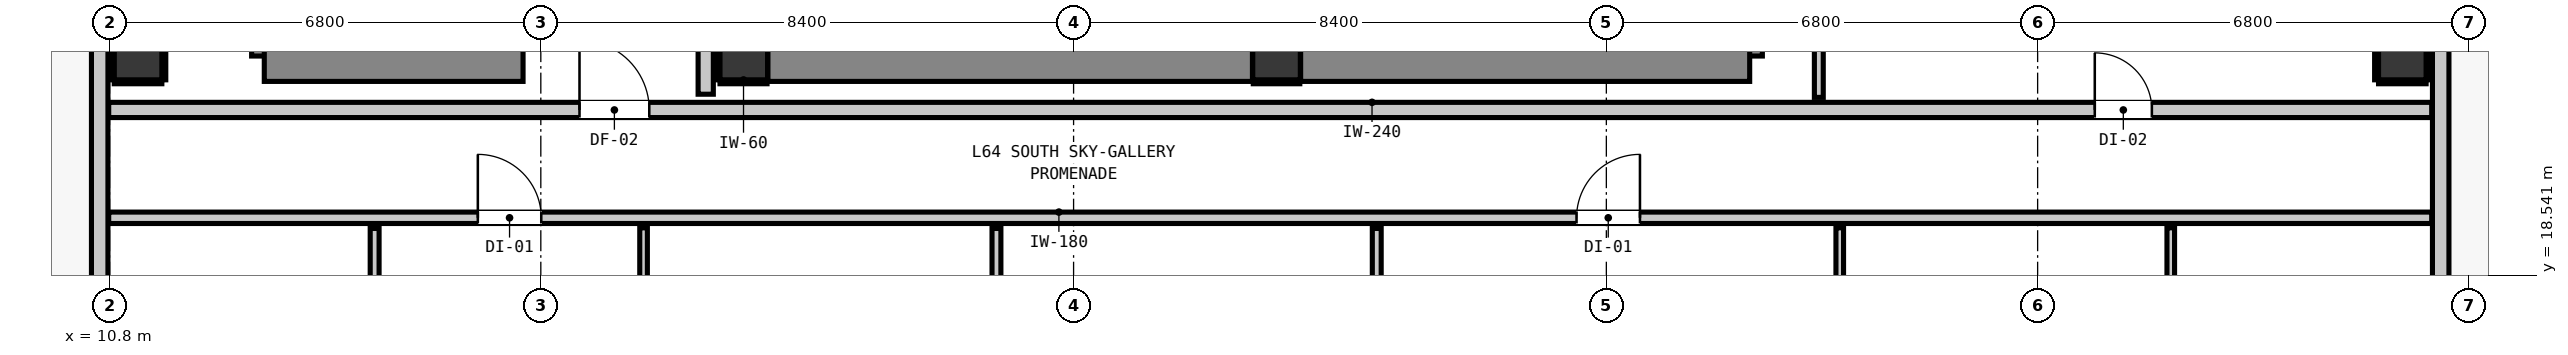
"""IFC4 building model, lengths in metres.
Left out: names, types, materials, properties, quantities, classifications, styles, units other than length and angle.
Written with IfcOpenShell. Run it as: python <this file> out.ifc"""

import sys

from ifc_helpers import new_model, si_unit, direction, frame, frame_2d, origin, origin_2d, place, context, subcontext, project, spatial, rectangle, extrude, element, fill, save


model = new_model("IFC4")
c1 = context("Model", 3, precision=1e-05, world=origin(), true_north=direction((0.0, 1.0)))
c2 = subcontext(c1, "Body", "Model", "MODEL_VIEW")
j1 = project(units=[si_unit("LENGTHUNIT", "METRE"), si_unit("PLANEANGLEUNIT", "RADIAN")], contexts=[c1])
p1 = place(None, origin())
s1 = spatial("IfcSite", under=j1, at=p1, CompositionType="ELEMENT")
p2 = place(p1, origin())
s2 = spatial("IfcBuilding", under=s1, at=p2, CompositionType="ELEMENT")
p3 = place(p2, frame((0.0, 0.0, 220.04)))
s3 = spatial("IfcBuildingStorey", under=s2, at=p3, CompositionType="ELEMENT", Elevation=220.04)
for number, where, z_axis, x_axis in (
    (1, (20.8, 22.0, 0.0), (0.0, 0.0, 1.0), (1.0, 0.0, 0.0)),
    (2, (29.2, 22.0, 0.0), (0.0, 0.0, 1.0), (1.0, 0.0, 0.0)),
):
    element("IfcColumn", number, at=place(p3, frame(where, z_axis=z_axis, x_axis=x_axis)), inside=s3, PredefinedType="COLUMN", context=c2, shape_type="SweptSolid", body=[
        extrude(rectangle(XDim=0.75, YDim=0.75, at=origin_2d()), origin(), (0.0, 0.0, 1.0), 3.32),
    ])
p4 = place(p3, frame((13.44, 22.0, 0.0), z_axis=(0.0, 0.0, 1.0), x_axis=(0.0, 1.0, 0.0)))
e3 = element("IfcWall", 3, at=p4, inside=s3, PredefinedType="SHEAR", context=c2, shape_type="SweptSolid", body=[
    extrude(rectangle(XDim=8.32, YDim=0.8, at=frame_2d((4.16, 0.0))), origin(), (0.0, 0.0, 1.0), 3.32),
])
p5 = place(p3, frame((13.24, 22.0, 0.0), z_axis=(0.0, 0.0, 1.0), x_axis=(1.0, 0.0, 0.0)))
e4 = element("IfcWall", 4, at=p5, inside=s3, PredefinedType="SHEAR", context=c2, shape_type="SweptSolid", body=[
    extrude(rectangle(XDim=4.08, YDim=0.8, at=frame_2d((2.04, 0.0))), origin(), (0.0, 0.0, 1.0), 3.32),
])
p6 = place(p3, frame((36.46, 22.0, 0.0), z_axis=(0.0, 0.0, 1.0), x_axis=(0.0, 1.0, 0.0)))
e5 = element("IfcWall", 5, at=p6, inside=s3, PredefinedType="SHEAR", context=c2, shape_type="SweptSolid", body=[
    extrude(rectangle(XDim=8.32, YDim=0.8, at=frame_2d((4.16, 0.0))), origin(), (0.0, 0.0, 1.0), 3.32),
])
p7 = place(p3, frame((29.58, 22.0, 0.0), z_axis=(0.0, 0.0, 1.0), x_axis=(1.0, 0.0, 0.0)))
e6 = element("IfcWall", 6, at=p7, inside=s3, PredefinedType="SHEAR", context=c2, shape_type="SweptSolid", body=[
    extrude(rectangle(XDim=7.08, YDim=0.8, at=frame_2d((3.54, 0.0))), origin(), (0.0, 0.0, 1.0), 3.32),
])
p8 = place(p3, frame((21.18, 22.0, 0.0), z_axis=(0.0, 0.0, 1.0), x_axis=(1.0, 0.0, 0.0)))
e7 = element("IfcWall", 7, at=p8, inside=s3, PredefinedType="SHEAR", context=c2, shape_type="SweptSolid", body=[
    extrude(rectangle(XDim=7.64, YDim=0.8, at=frame_2d((3.82, 0.0))), origin(), (0.0, 0.0, 1.0), 3.32),
])
for number, where, z_axis, x_axis in (
    (8, (11.25, 22.0, 0.0), (0.0, 0.0, 1.0), (1.0, 0.0, 0.0)),
    (9, (46.95, 22.0, 0.0), (0.0, 0.0, 1.0), (1.0, 0.0, 0.0)),
):
    element("IfcColumn", number, at=place(p3, frame(where, z_axis=z_axis, x_axis=x_axis)), inside=s3, PredefinedType="COLUMN", context=c2, shape_type="SweptSolid", body=[
        extrude(rectangle(XDim=0.75, YDim=0.75, at=origin_2d()), origin(), (0.0, 0.0, 1.0), 3.32),
    ])
p9 = place(p3, frame((10.645, 12.345, 0.0), z_axis=(0.0, 0.0, 1.0), x_axis=(0.0, 1.0, 0.0)))
e10 = element("IfcWall", 10, at=p9, inside=s3, PredefinedType="STANDARD", context=c2, shape_type="SweptSolid", body=[
    extrude(rectangle(XDim=30.31, YDim=0.26, at=frame_2d((15.155, 0.0))), origin(), (0.0, 0.0, 1.0), 3.1),
])
p10 = place(p9, frame((0.91, 0.0, 0.0)))
e11 = element("IfcOpeningElement", 11, at=p10, cuts=e10, PredefinedType="OPENING", context=c2, shape_type="SweptSolid", body=[
    extrude(rectangle(XDim=1.0, YDim=2.15, at=frame_2d((0.5, 1.075))), frame((0.0, 0.14, 0.0), z_axis=(0.0, -1.0, 0.0), x_axis=(1.0, 0.0, 0.0)), (0.0, 0.0, 1.0), 0.28),
])
p11 = place(p9, frame((2.322, 0.0, 0.85)))
e12 = element("IfcOpeningElement", 12, at=p11, cuts=e10, PredefinedType="OPENING", context=c2, shape_type="SweptSolid", body=[
    extrude(rectangle(XDim=0.58, YDim=1.5, at=frame_2d((0.29, 0.75))), frame((0.0, 0.14, 0.0), z_axis=(0.0, -1.0, 0.0), x_axis=(1.0, 0.0, 0.0)), (0.0, 0.0, 1.0), 0.28),
])
p12 = place(p3, frame((47.555, 42.655, 0.0), z_axis=(0.0, 0.0, 1.0), x_axis=(0.0, -1.0, 0.0)))
e13 = element("IfcWall", 13, at=p12, inside=s3, PredefinedType="STANDARD", context=c2, shape_type="SweptSolid", body=[
    extrude(rectangle(XDim=30.31, YDim=0.26, at=frame_2d((15.155, 0.0))), origin(), (0.0, 0.0, 1.0), 3.1),
])
p13 = place(p12, frame((4.082, 0.0, 0.0)))
e14 = element("IfcOpeningElement", 14, at=p13, cuts=e13, PredefinedType="OPENING", context=c2, shape_type="SweptSolid", body=[
    extrude(rectangle(XDim=1.0, YDim=2.15, at=frame_2d((0.5, 1.075))), frame((0.0, 0.14, 0.0), z_axis=(0.0, -1.0, 0.0), x_axis=(1.0, 0.0, 0.0)), (0.0, 0.0, 1.0), 0.28),
])
p14 = place(p12, frame((24.701, 0.0, 0.85)))
e15 = element("IfcOpeningElement", 15, at=p14, cuts=e13, PredefinedType="OPENING", context=c2, shape_type="SweptSolid", body=[
    extrude(rectangle(XDim=0.9, YDim=1.5, at=frame_2d((0.45, 0.75))), frame((0.0, 0.14, 0.0), z_axis=(0.0, -1.0, 0.0), x_axis=(1.0, 0.0, 0.0)), (0.0, 0.0, 1.0), 0.28),
])
p15 = place(p12, frame((28.258, 0.0, 0.85)))
e16 = element("IfcOpeningElement", 16, at=p15, cuts=e13, PredefinedType="OPENING", context=c2, shape_type="SweptSolid", body=[
    extrude(rectangle(XDim=0.9, YDim=1.5, at=frame_2d((0.45, 0.75))), frame((0.0, 0.14, 0.0), z_axis=(0.0, -1.0, 0.0), x_axis=(1.0, 0.0, 0.0)), (0.0, 0.0, 1.0), 0.28),
])
p16 = place(p12, frame((15.855, 0.0, 0.85)))
e17 = element("IfcOpeningElement", 17, at=p16, cuts=e13, PredefinedType="OPENING", context=c2, shape_type="SweptSolid", body=[
    extrude(rectangle(XDim=0.9, YDim=1.5, at=frame_2d((0.45, 0.75))), frame((0.0, 0.14, 0.0), z_axis=(0.0, -1.0, 0.0), x_axis=(1.0, 0.0, 0.0)), (0.0, 0.0, 1.0), 0.28),
])
p17 = place(p3, frame((10.787, 21.15, 0.0), z_axis=(0.0, 0.0, 1.0), x_axis=(1.0, 0.0, 0.0)))
e18 = element("IfcWall", 18, at=p17, inside=s3, PredefinedType="PARTITIONING", context=c2, shape_type="SweptSolid", body=[
    extrude(rectangle(XDim=36.626, YDim=0.24, at=frame_2d((18.313, 0.0))), origin(), (0.0, 0.0, 1.0), 3.1),
])
p18 = place(p17, frame((7.423, 0.0, 0.0)))
e19 = element("IfcOpeningElement", 19, at=p18, cuts=e18, PredefinedType="OPENING", context=c2, shape_type="SweptSolid", body=[
    extrude(rectangle(XDim=1.1, YDim=2.15, at=frame_2d((0.55, 1.075))), frame((0.0, 0.13, 0.0), z_axis=(0.0, -1.0, 0.0), x_axis=(1.0, 0.0, 0.0)), (0.0, 0.0, 1.0), 0.26),
])
p19 = place(p17, frame((31.314, 0.0, 0.0)))
e20 = element("IfcOpeningElement", 20, at=p19, cuts=e18, PredefinedType="OPENING", context=c2, shape_type="SweptSolid", body=[
    extrude(rectangle(XDim=0.9, YDim=2.1, at=frame_2d((0.45, 1.05))), frame((0.0, 0.13, 0.0), z_axis=(0.0, -1.0, 0.0), x_axis=(1.0, 0.0, 0.0)), (0.0, 0.0, 1.0), 0.26),
])
p20 = place(p3, frame((10.787, 19.45, 0.0), z_axis=(0.0, 0.0, 1.0), x_axis=(1.0, 0.0, 0.0)))
e21 = element("IfcWall", 21, at=p20, inside=s3, PredefinedType="PARTITIONING", context=c2, shape_type="SweptSolid", body=[
    extrude(rectangle(XDim=36.626, YDim=0.18, at=frame_2d((18.313, 0.0))), origin(), (0.0, 0.0, 1.0), 3.1),
])
p21 = place(p20, frame((5.82, 0.0, 0.0)))
e22 = element("IfcOpeningElement", 22, at=p21, cuts=e21, PredefinedType="OPENING", context=c2, shape_type="SweptSolid", body=[
    extrude(rectangle(XDim=1.0, YDim=2.15, at=frame_2d((0.5, 1.075))), frame((0.0, 0.1, 0.0), z_axis=(0.0, -1.0, 0.0), x_axis=(1.0, 0.0, 0.0)), (0.0, 0.0, 1.0), 0.2),
])
p22 = place(p20, frame((23.143, 0.0, 0.0)))
e23 = element("IfcOpeningElement", 23, at=p22, cuts=e21, PredefinedType="OPENING", context=c2, shape_type="SweptSolid", body=[
    extrude(rectangle(XDim=1.0, YDim=2.15, at=frame_2d((0.5, 1.075))), frame((0.0, 0.1, 0.0), z_axis=(0.0, -1.0, 0.0), x_axis=(1.0, 0.0, 0.0)), (0.0, 0.0, 1.0), 0.2),
])
p23 = place(p3, frame((20.2, 21.398, 0.0), z_axis=(0.0, 0.0, 1.0), x_axis=(0.0, 1.0, 0.0)))
e24 = element("IfcWall", 24, at=p23, inside=s3, PredefinedType="PARTITIONING", context=c2, shape_type="SweptSolid", body=[
    extrude(rectangle(XDim=6.754, YDim=0.24, at=frame_2d((3.377, 0.0))), origin(), (0.0, 0.0, 1.0), 3.1),
])
p24 = place(p3, frame((14.98, 15.707, 0.0), z_axis=(0.0, 0.0, 1.0), x_axis=(0.0, 1.0, 0.0)))
e25 = element("IfcWall", 25, at=p24, inside=s3, PredefinedType="PARTITIONING", context=c2, shape_type="SweptSolid", body=[
    extrude(rectangle(XDim=3.575, YDim=0.14, at=frame_2d((1.788, 0.0))), origin(), (0.0, 0.0, 1.0), 3.1),
])
p25 = place(p24, frame((1.355, 0.0, 0.0)))
e26 = element("IfcOpeningElement", 26, at=p25, cuts=e25, PredefinedType="OPENING", context=c2, shape_type="SweptSolid", body=[
    extrude(rectangle(XDim=0.86, YDim=2.02, at=frame_2d((0.43, 1.01))), frame((0.0, 0.08, 0.0), z_axis=(0.0, -1.0, 0.0), x_axis=(1.0, 0.0, 0.0)), (0.0, 0.0, 1.0), 0.16),
])
p26 = place(p3, frame((24.784, 15.707, 0.0), z_axis=(0.0, 0.0, 1.0), x_axis=(0.0, 1.0, 0.0)))
e27 = element("IfcWall", 27, at=p26, inside=s3, PredefinedType="PARTITIONING", context=c2, shape_type="SweptSolid", body=[
    extrude(rectangle(XDim=3.575, YDim=0.14, at=frame_2d((1.788, 0.0))), origin(), (0.0, 0.0, 1.0), 3.1),
])
p27 = place(p3, frame((30.78, 15.707, 0.0), z_axis=(0.0, 0.0, 1.0), x_axis=(0.0, 1.0, 0.0)))
e28 = element("IfcWall", 28, at=p27, inside=s3, PredefinedType="PARTITIONING", context=c2, shape_type="SweptSolid", body=[
    extrude(rectangle(XDim=3.575, YDim=0.14, at=frame_2d((1.788, 0.0))), origin(), (0.0, 0.0, 1.0), 3.1),
])
p28 = place(p27, frame((1.355, 0.0, 0.0)))
e29 = element("IfcOpeningElement", 29, at=p28, cuts=e28, PredefinedType="OPENING", context=c2, shape_type="SweptSolid", body=[
    extrude(rectangle(XDim=0.86, YDim=2.02, at=frame_2d((0.43, 1.01))), frame((0.0, 0.08, 0.0), z_axis=(0.0, -1.0, 0.0), x_axis=(1.0, 0.0, 0.0)), (0.0, 0.0, 1.0), 0.16),
])
p29 = place(p3, frame((37.75, 21.348, 0.0), z_axis=(0.0, 0.0, 1.0), x_axis=(0.0, 1.0, 0.0)))
e30 = element("IfcWall", 30, at=p29, inside=s3, PredefinedType="PARTITIONING", context=c2, shape_type="SweptSolid", body=[
    extrude(rectangle(XDim=10.134, YDim=0.14, at=frame_2d((5.067, 0.0))), origin(), (0.0, 0.0, 1.0), 3.1),
])
p30 = place(p3, frame((19.22, 15.697, 0.0), z_axis=(0.0, 0.0, 1.0), x_axis=(0.0, 1.0, 0.0)))
e31 = element("IfcWall", 31, at=p30, inside=s3, PredefinedType="PARTITIONING", context=c2, shape_type="SweptSolid", body=[
    extrude(rectangle(XDim=3.595, YDim=0.12, at=frame_2d((1.797, 0.0))), origin(), (0.0, 0.0, 1.0), 3.1),
])
p31 = place(p30, frame((1.345, 0.0, 0.0)))
e32 = element("IfcOpeningElement", 32, at=p31, cuts=e31, PredefinedType="OPENING", context=c2, shape_type="SweptSolid", body=[
    extrude(rectangle(XDim=0.9, YDim=2.1, at=frame_2d((0.45, 1.05))), frame((0.0, 0.07, 0.0), z_axis=(0.0, -1.0, 0.0), x_axis=(1.0, 0.0, 0.0)), (0.0, 0.0, 1.0), 0.14),
])
p32 = place(p3, frame((38.08, 15.697, 0.0), z_axis=(0.0, 0.0, 1.0), x_axis=(0.0, 1.0, 0.0)))
e33 = element("IfcWall", 33, at=p32, inside=s3, PredefinedType="PARTITIONING", context=c2, shape_type="SweptSolid", body=[
    extrude(rectangle(XDim=3.595, YDim=0.12, at=frame_2d((1.797, 0.0))), origin(), (0.0, 0.0, 1.0), 3.1),
])
p33 = place(p32, frame((1.345, 0.0, 0.0)))
e34 = element("IfcOpeningElement", 34, at=p33, cuts=e33, PredefinedType="OPENING", context=c2, shape_type="SweptSolid", body=[
    extrude(rectangle(XDim=0.9, YDim=2.1, at=frame_2d((0.45, 1.05))), frame((0.0, 0.07, 0.0), z_axis=(0.0, -1.0, 0.0), x_axis=(1.0, 0.0, 0.0)), (0.0, 0.0, 1.0), 0.14),
])
p34 = place(p3, frame((43.299, 15.697, 0.0), z_axis=(0.0, 0.0, 1.0), x_axis=(0.0, 1.0, 0.0)))
e35 = element("IfcWall", 35, at=p34, inside=s3, PredefinedType="PARTITIONING", context=c2, shape_type="SweptSolid", body=[
    extrude(rectangle(XDim=3.595, YDim=0.12, at=frame_2d((1.797, 0.0))), origin(), (0.0, 0.0, 1.0), 3.1),
])
p35 = place(p34, frame((1.358, 0.0, 0.0)))
e36 = element("IfcOpeningElement", 36, at=p35, cuts=e35, PredefinedType="OPENING", context=c2, shape_type="SweptSolid", body=[
    extrude(rectangle(XDim=0.9, YDim=2.1, at=frame_2d((0.45, 1.05))), frame((0.0, 0.07, 0.0), z_axis=(0.0, -1.0, 0.0), x_axis=(1.0, 0.0, 0.0)), (0.0, 0.0, 1.0), 0.14),
])
p36 = place(p3, frame((20.425, 21.593, 0.0), z_axis=(0.0, 0.0, 1.0), x_axis=(1.0, 0.0, 0.0)))
e37 = element("IfcWall", 37, at=p36, inside=s3, PredefinedType="PARTITIONING", context=c2, shape_type="SweptSolid", body=[
    extrude(rectangle(XDim=0.742, YDim=0.06, at=frame_2d((0.371, 0.0))), origin(), (0.0, 0.0, 1.0), 1.45),
])
p37 = place(p3, frame((20.393, 21.625, 0.0), z_axis=(0.0, 0.0, 1.0), x_axis=(0.0, 1.0, 0.0)))
e38 = element("IfcWall", 38, at=p37, inside=s3, PredefinedType="PARTITIONING", context=c2, shape_type="SweptSolid", body=[
    extrude(rectangle(XDim=0.75, YDim=0.06, at=frame_2d((0.375, 0.0))), origin(), (0.0, 0.0, 1.0), 1.45),
])
p38 = place(p3, frame((28.833, 21.593, 0.0), z_axis=(0.0, 0.0, 1.0), x_axis=(1.0, 0.0, 0.0)))
e39 = element("IfcWall", 39, at=p38, inside=s3, PredefinedType="PARTITIONING", context=c2, shape_type="SweptSolid", body=[
    extrude(rectangle(XDim=0.734, YDim=0.06, at=frame_2d((0.367, 0.0))), origin(), (0.0, 0.0, 1.0), 1.45),
])
for number, where, z_axis, x_axis in (
    (40, (10.875, 21.593, 0.0), (0.0, 0.0, 1.0), (1.0, 0.0, 0.0)),
    (41, (10.843, 21.625, 0.0), (0.0, 0.0, 1.0), (0.0, 1.0, 0.0)),
    (42, (11.657, 21.625, 0.0), (0.0, 0.0, 1.0), (0.0, 1.0, 0.0)),
    (43, (46.575, 21.593, 0.0), (0.0, 0.0, 1.0), (1.0, 0.0, 0.0)),
    (44, (46.543, 21.625, 0.0), (0.0, 0.0, 1.0), (0.0, 1.0, 0.0)),
    (45, (47.357, 21.625, 0.0), (0.0, 0.0, 1.0), (0.0, 1.0, 0.0)),
):
    element("IfcWall", number, at=place(p3, frame(where, z_axis=z_axis, x_axis=x_axis)), inside=s3, PredefinedType="PARTITIONING", context=c2, shape_type="SweptSolid", body=[
        extrude(rectangle(XDim=0.75, YDim=0.06, at=frame_2d((0.375, 0.0))), origin(), (0.0, 0.0, 1.0), 1.45),
    ])
p39 = place(p18, origin())
e46 = element("IfcDoor", 46, at=p39, inside=s3, OperationType="SINGLE_SWING_LEFT", PredefinedType="DOOR", context=c2, shape_type="SweptSolid", body=[
    extrude(rectangle(XDim=1.1, YDim=2.15, at=frame_2d((0.55, 1.075))), frame((0.0, 0.025, 0.0), z_axis=(0.0, -1.0, 0.0), x_axis=(1.0, 0.0, 0.0)), (0.0, 0.0, 1.0), 0.05),
])
fill(e19, e46)
p40 = place(p21, origin())
e47 = element("IfcDoor", 47, at=p40, inside=s3, OperationType="SINGLE_SWING_LEFT", PredefinedType="DOOR", context=c2, shape_type="SweptSolid", body=[
    extrude(rectangle(XDim=1.0, YDim=2.15, at=frame_2d((0.5, 1.075))), frame((0.0, 0.025, 0.0), z_axis=(0.0, -1.0, 0.0), x_axis=(1.0, 0.0, 0.0)), (0.0, 0.0, 1.0), 0.05),
])
fill(e22, e47)
p41 = place(p22, origin())
e48 = element("IfcDoor", 48, at=p41, inside=s3, OperationType="SINGLE_SWING_RIGHT", PredefinedType="DOOR", context=c2, shape_type="SweptSolid", body=[
    extrude(rectangle(XDim=1.0, YDim=2.15, at=frame_2d((0.5, 1.075))), frame((0.0, 0.025, 0.0), z_axis=(0.0, -1.0, 0.0), x_axis=(1.0, 0.0, 0.0)), (0.0, 0.0, 1.0), 0.05),
])
fill(e23, e48)
p42 = place(p19, origin())
e49 = element("IfcDoor", 49, at=p42, inside=s3, OperationType="SINGLE_SWING_LEFT", PredefinedType="DOOR", context=c2, shape_type="SweptSolid", body=[
    extrude(rectangle(XDim=0.9, YDim=2.1, at=frame_2d((0.45, 1.05))), frame((0.0, 0.025, 0.0), z_axis=(0.0, -1.0, 0.0), x_axis=(1.0, 0.0, 0.0)), (0.0, 0.0, 1.0), 0.05),
])
fill(e20, e49)
save(model, sys.argv[1])
